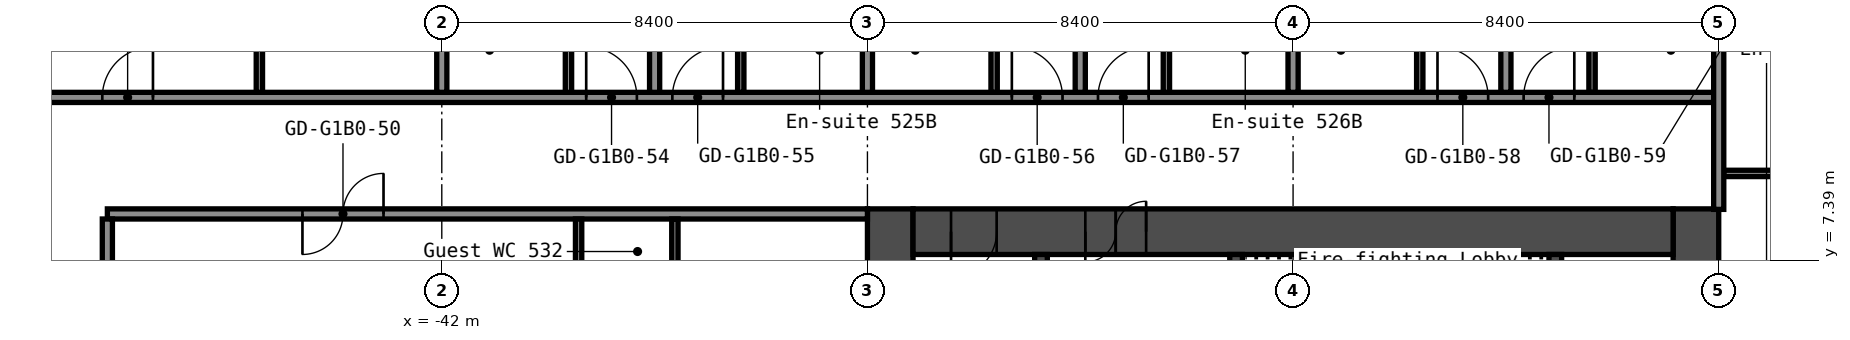
"""IFC4 building model, lengths in metres.
Left out: names, types, materials, properties, quantities, classifications, styles, units other than length and angle.
Written with IfcOpenShell. Run it as: python <this file> out.ifc"""

import sys

from ifc_helpers import new_model, si_unit, direction, frame, frame_2d, origin, place, context, subcontext, project, spatial, rectangle, extrude, element, fill, save


model = new_model("IFC4")
c1 = context("Model", 3, precision=1e-05, world=origin(), true_north=direction((0.0, 1.0)))
c2 = subcontext(c1, "Body", "Model", "MODEL_VIEW")
j1 = project(units=[si_unit("LENGTHUNIT", "METRE"), si_unit("PLANEANGLEUNIT", "RADIAN")], contexts=[c1])
p1 = place(None, origin())
s1 = spatial("IfcSite", under=j1, at=p1, CompositionType="ELEMENT")
p2 = place(p1, origin())
s2 = spatial("IfcBuilding", under=s1, at=p2, CompositionType="ELEMENT")
p3 = place(p2, frame((0.0, 0.0, 23.0)))
s3 = spatial("IfcBuildingStorey", under=s2, at=p3, CompositionType="ELEMENT", Elevation=23.0)
p4 = place(p3, frame((-17.25, -8.4, 0.0), z_axis=(0.0, 0.0, 1.0), x_axis=(0.0, 1.0, 0.0)))
e1 = element("IfcWall", 1, at=p4, inside=s3, PredefinedType="SHEAR", context=c2, shape_type="SweptSolid", body=[
    extrude(rectangle(XDim=16.8, YDim=0.9, at=frame_2d((8.4, 0.0))), origin(), (0.0, 0.0, 1.0), 2.8),
])
p5 = place(p4, frame((12.75, 0.0, 0.0)))
e2 = element("IfcOpeningElement", 2, at=p5, cuts=e1, PredefinedType="OPENING", context=c2, shape_type="SweptSolid", body=[
    extrude(rectangle(XDim=1.2, YDim=2.1, at=frame_2d((0.6, 1.05))), frame((0.0, 0.46, 0.0), z_axis=(0.0, -1.0, 0.0), x_axis=(1.0, 0.0, 0.0)), (0.0, 0.0, 1.0), 0.92),
])
p6 = place(p4, frame((2.85, 0.0, 0.0)))
e3 = element("IfcOpeningElement", 3, at=p6, cuts=e1, PredefinedType="OPENING", context=c2, shape_type="SweptSolid", body=[
    extrude(rectangle(XDim=1.2, YDim=2.1, at=frame_2d((0.6, 1.05))), frame((0.0, 0.46, 0.0), z_axis=(0.0, -1.0, 0.0), x_axis=(1.0, 0.0, 0.0)), (0.0, 0.0, 1.0), 0.92),
])
p7 = place(p3, frame((-33.15, -8.4, 0.0), z_axis=(0.0, 0.0, 1.0), x_axis=(0.0, 1.0, 0.0)))
e4 = element("IfcWall", 4, at=p7, inside=s3, PredefinedType="SHEAR", context=c2, shape_type="SweptSolid", body=[
    extrude(rectangle(XDim=16.8, YDim=0.9, at=frame_2d((8.4, 0.0))), origin(), (0.0, 0.0, 1.0), 2.8),
])
p8 = place(p3, frame((-32.7, 7.95, 0.0), z_axis=(0.0, 0.0, 1.0), x_axis=(1.0, 0.0, 0.0)))
e5 = element("IfcWall", 5, at=p8, inside=s3, PredefinedType="SHEAR", context=c2, shape_type="SweptSolid", body=[
    extrude(rectangle(XDim=15.0, YDim=0.9, at=frame_2d((7.5, 0.0))), origin(), (0.0, 0.0, 1.0), 2.8),
])
p9 = place(p8, frame((3.4, 0.0, 0.0)))
e6 = element("IfcOpeningElement", 6, at=p9, cuts=e5, PredefinedType="OPENING", context=c2, shape_type="SweptSolid", body=[
    extrude(rectangle(XDim=1.2, YDim=2.1, at=frame_2d((0.6, 1.05))), frame((0.0, 0.46, 0.0), z_axis=(0.0, -1.0, 0.0), x_axis=(1.0, 0.0, 0.0)), (0.0, 0.0, 1.0), 0.92),
])
p10 = place(p8, frame((0.75, 0.0, 0.0)))
e7 = element("IfcOpeningElement", 7, at=p10, cuts=e5, PredefinedType="OPENING", context=c2, shape_type="SweptSolid", body=[
    extrude(rectangle(XDim=0.9, YDim=2.1, at=frame_2d((0.45, 1.05))), frame((0.0, 0.46, 0.0), z_axis=(0.0, -1.0, 0.0), x_axis=(1.0, 0.0, 0.0)), (0.0, 0.0, 1.0), 0.92),
])
p11 = place(p3, frame((-20.025, 1.2, 0.0), z_axis=(0.0, 0.0, 1.0), x_axis=(0.0, 1.0, 0.0)))
e8 = element("IfcWall", 8, at=p11, inside=s3, PredefinedType="SHEAR", context=c2, shape_type="SweptSolid", body=[
    extrude(rectangle(XDim=6.3, YDim=0.25, at=frame_2d((3.15, 0.0))), origin(), (0.0, 0.0, 1.0), 2.8),
])
p12 = place(p3, frame((-26.325, 3.75, 0.0), z_axis=(0.0, 0.0, 1.0), x_axis=(0.0, 1.0, 0.0)))
e9 = element("IfcWall", 9, at=p12, inside=s3, PredefinedType="SHEAR", context=c2, shape_type="SweptSolid", body=[
    extrude(rectangle(XDim=3.75, YDim=0.25, at=frame_2d((1.875, 0.0))), origin(), (0.0, 0.0, 1.0), 2.8),
])
p13 = place(p12, frame((1.25, 0.0, 0.0)))
e10 = element("IfcOpeningElement", 10, at=p13, cuts=e9, PredefinedType="OPENING", context=c2, shape_type="SweptSolid", body=[
    extrude(rectangle(XDim=1.2, YDim=2.1, at=frame_2d((0.6, 1.05))), frame((0.0, 0.135, 0.0), z_axis=(0.0, -1.0, 0.0), x_axis=(1.0, 0.0, 0.0)), (0.0, 0.0, 1.0), 0.27),
])
p14 = place(p3, frame((-30.175, 1.45, 0.0), z_axis=(0.0, 0.0, 1.0), x_axis=(0.0, 1.0, 0.0)))
e11 = element("IfcWall", 11, at=p14, inside=s3, PredefinedType="SHEAR", context=c2, shape_type="SweptSolid", body=[
    extrude(rectangle(XDim=6.05, YDim=0.25, at=frame_2d((3.025, 0.0))), origin(), (0.0, 0.0, 1.0), 2.8),
])
p15 = place(p14, frame((2.625, 0.0, 0.0)))
e12 = element("IfcOpeningElement", 12, at=p15, cuts=e11, PredefinedType="OPENING", context=c2, shape_type="SweptSolid", body=[
    extrude(rectangle(XDim=1.1, YDim=2.1, at=frame_2d((0.55, 1.05))), frame((0.0, 0.135, 0.0), z_axis=(0.0, -1.0, 0.0), x_axis=(1.0, 0.0, 0.0)), (0.0, 0.0, 1.0), 0.27),
])
p16 = place(p3, frame((-48.6, 8.3, 0.0), z_axis=(0.0, 0.0, 1.0), x_axis=(1.0, 0.0, 0.0)))
e13 = element("IfcWall", 13, at=p16, inside=s3, PredefinedType="PARTITIONING", context=c2, shape_type="SweptSolid", body=[
    extrude(rectangle(XDim=15.0, YDim=0.2, at=frame_2d((7.5, 0.0))), origin(), (0.0, 0.0, 1.0), 2.8),
])
p17 = place(p16, frame((3.85, 0.0, 0.0)))
e14 = element("IfcOpeningElement", 14, at=p17, cuts=e13, PredefinedType="OPENING", context=c2, shape_type="SweptSolid", body=[
    extrude(rectangle(XDim=1.6, YDim=2.1, at=frame_2d((0.8, 1.05))), frame((0.0, 0.11, 0.0), z_axis=(0.0, -1.0, 0.0), x_axis=(1.0, 0.0, 0.0)), (0.0, 0.0, 1.0), 0.22),
])
p18 = place(p3, frame((-16.7, 9.1, 0.0), z_axis=(0.0, 0.0, 1.0), x_axis=(1.0, 0.0, 0.0)))
e15 = element("IfcWall", 15, at=p18, inside=s3, PredefinedType="PARTITIONING", context=c2, shape_type="SweptSolid", body=[
    extrude(rectangle(XDim=2.337, YDim=0.125, at=frame_2d((1.169, 0.0))), origin(), (0.0, 0.0, 1.0), 2.8),
])
p19 = place(p3, frame((-51.1, 10.6, 0.0), z_axis=(0.0, 0.0, 1.0), x_axis=(1.0, 0.0, 0.0)))
e16 = element("IfcWall", 16, at=p19, inside=s3, PredefinedType="PARTITIONING", context=c2, shape_type="SweptSolid", body=[
    extrude(rectangle(XDim=34.3, YDim=0.2, at=frame_2d((17.15, 0.0))), origin(), (0.0, 0.0, 1.0), 2.8),
])
p20 = place(p19, frame((2.4, 0.0, 0.0)))
e17 = element("IfcOpeningElement", 17, at=p20, cuts=e16, PredefinedType="OPENING", context=c2, shape_type="SweptSolid", body=[
    extrude(rectangle(XDim=1.0, YDim=2.1, at=frame_2d((0.5, 1.05))), frame((0.0, 0.11, 0.0), z_axis=(0.0, -1.0, 0.0), x_axis=(1.0, 0.0, 0.0)), (0.0, 0.0, 1.0), 0.22),
])
p21 = place(p19, frame((11.95, 0.0, 0.0)))
e18 = element("IfcOpeningElement", 18, at=p21, cuts=e16, PredefinedType="OPENING", context=c2, shape_type="SweptSolid", body=[
    extrude(rectangle(XDim=1.0, YDim=2.1, at=frame_2d((0.5, 1.05))), frame((0.0, 0.11, 0.0), z_axis=(0.0, -1.0, 0.0), x_axis=(1.0, 0.0, 0.0)), (0.0, 0.0, 1.0), 0.22),
])
p22 = place(p19, frame((13.65, 0.0, 0.0)))
e19 = element("IfcOpeningElement", 19, at=p22, cuts=e16, PredefinedType="OPENING", context=c2, shape_type="SweptSolid", body=[
    extrude(rectangle(XDim=1.0, YDim=2.1, at=frame_2d((0.5, 1.05))), frame((0.0, 0.11, 0.0), z_axis=(0.0, -1.0, 0.0), x_axis=(1.0, 0.0, 0.0)), (0.0, 0.0, 1.0), 0.22),
])
p23 = place(p19, frame((20.35, 0.0, 0.0)))
e20 = element("IfcOpeningElement", 20, at=p23, cuts=e16, PredefinedType="OPENING", context=c2, shape_type="SweptSolid", body=[
    extrude(rectangle(XDim=1.0, YDim=2.1, at=frame_2d((0.5, 1.05))), frame((0.0, 0.11, 0.0), z_axis=(0.0, -1.0, 0.0), x_axis=(1.0, 0.0, 0.0)), (0.0, 0.0, 1.0), 0.22),
])
p24 = place(p19, frame((22.05, 0.0, 0.0)))
e21 = element("IfcOpeningElement", 21, at=p24, cuts=e16, PredefinedType="OPENING", context=c2, shape_type="SweptSolid", body=[
    extrude(rectangle(XDim=1.0, YDim=2.1, at=frame_2d((0.5, 1.05))), frame((0.0, 0.11, 0.0), z_axis=(0.0, -1.0, 0.0), x_axis=(1.0, 0.0, 0.0)), (0.0, 0.0, 1.0), 0.22),
])
p25 = place(p19, frame((28.75, 0.0, 0.0)))
e22 = element("IfcOpeningElement", 22, at=p25, cuts=e16, PredefinedType="OPENING", context=c2, shape_type="SweptSolid", body=[
    extrude(rectangle(XDim=1.0, YDim=2.1, at=frame_2d((0.5, 1.05))), frame((0.0, 0.11, 0.0), z_axis=(0.0, -1.0, 0.0), x_axis=(1.0, 0.0, 0.0)), (0.0, 0.0, 1.0), 0.22),
])
p26 = place(p19, frame((30.45, 0.0, 0.0)))
e23 = element("IfcOpeningElement", 23, at=p26, cuts=e16, PredefinedType="OPENING", context=c2, shape_type="SweptSolid", body=[
    extrude(rectangle(XDim=1.0, YDim=2.1, at=frame_2d((0.5, 1.05))), frame((0.0, 0.11, 0.0), z_axis=(0.0, -1.0, 0.0), x_axis=(1.0, 0.0, 0.0)), (0.0, 0.0, 1.0), 0.22),
])
p27 = place(p3, frame((-48.6, -8.2, 0.0), z_axis=(0.0, 0.0, 1.0), x_axis=(0.0, 1.0, 0.0)))
e24 = element("IfcWall", 24, at=p27, inside=s3, PredefinedType="PARTITIONING", context=c2, shape_type="SweptSolid", body=[
    extrude(rectangle(XDim=16.4, YDim=0.2, at=frame_2d((8.2, 0.0))), origin(), (0.0, 0.0, 1.0), 2.8),
])
p28 = place(p3, frame((-45.6, 10.7, 0.0), z_axis=(0.0, 0.0, 1.0), x_axis=(0.0, 1.0, 0.0)))
e25 = element("IfcWall", 25, at=p28, inside=s3, PredefinedType="PARTITIONING", context=c2, shape_type="SweptSolid", body=[
    extrude(rectangle(XDim=3.3, YDim=0.125, at=frame_2d((1.65, 0.0))), origin(), (0.0, 0.0, 1.0), 2.8),
])
p29 = place(p28, frame((1.1, 0.0, 0.0)))
e26 = element("IfcOpeningElement", 26, at=p29, cuts=e25, PredefinedType="OPENING", context=c2, shape_type="SweptSolid", body=[
    extrude(rectangle(XDim=1.0, YDim=2.1, at=frame_2d((0.5, 1.05))), frame((0.0, 0.073, 0.0), z_axis=(0.0, -1.0, 0.0), x_axis=(1.0, 0.0, 0.0)), (0.0, 0.0, 1.0), 0.145),
])
p30 = place(p3, frame((-42.0, 10.7, 0.0), z_axis=(0.0, 0.0, 1.0), x_axis=(0.0, 1.0, 0.0)))
e27 = element("IfcWall", 27, at=p30, inside=s3, PredefinedType="PARTITIONING", context=c2, shape_type="SweptSolid", body=[
    extrude(rectangle(XDim=9.6, YDim=0.2, at=frame_2d((4.8, 0.0))), origin(), (0.0, 0.0, 1.0), 2.8),
])
p31 = place(p3, frame((-39.5, 10.7, 0.0), z_axis=(0.0, 0.0, 1.0), x_axis=(0.0, 1.0, 0.0)))
e28 = element("IfcWall", 28, at=p31, inside=s3, PredefinedType="PARTITIONING", context=c2, shape_type="SweptSolid", body=[
    extrude(rectangle(XDim=2.9, YDim=0.125, at=frame_2d((1.45, 0.0))), origin(), (0.0, 0.0, 1.0), 2.8),
])
p32 = place(p31, frame((1.5, 0.0, 0.0)))
e29 = element("IfcOpeningElement", 29, at=p32, cuts=e28, PredefinedType="OPENING", context=c2, shape_type="SweptSolid", body=[
    extrude(rectangle(XDim=0.8, YDim=2.1, at=frame_2d((0.4, 1.05))), frame((0.0, 0.073, 0.0), z_axis=(0.0, -1.0, 0.0), x_axis=(1.0, 0.0, 0.0)), (0.0, 0.0, 1.0), 0.145),
])
p33 = place(p3, frame((-39.3, 5.9, 0.0), z_axis=(0.0, 0.0, 1.0), x_axis=(0.0, 1.0, 0.0)))
e30 = element("IfcWall", 30, at=p33, inside=s3, PredefinedType="PARTITIONING", context=c2, shape_type="SweptSolid", body=[
    extrude(rectangle(XDim=2.3, YDim=0.125, at=frame_2d((1.15, 0.0))), origin(), (0.0, 0.0, 1.0), 2.8),
])
p34 = place(p3, frame((-37.8, 10.7, 0.0), z_axis=(0.0, 0.0, 1.0), x_axis=(0.0, 1.0, 0.0)))
e31 = element("IfcWall", 31, at=p34, inside=s3, PredefinedType="PARTITIONING", context=c2, shape_type="SweptSolid", body=[
    extrude(rectangle(XDim=9.6, YDim=0.2, at=frame_2d((4.8, 0.0))), origin(), (0.0, 0.0, 1.0), 2.8),
])
p35 = place(p3, frame((-37.4, 4.9, 0.0), z_axis=(0.0, 0.0, 1.0), x_axis=(0.0, 1.0, 0.0)))
e32 = element("IfcWall", 32, at=p35, inside=s3, PredefinedType="PARTITIONING", context=c2, shape_type="SweptSolid", body=[
    extrude(rectangle(XDim=3.3, YDim=0.125, at=frame_2d((1.65, 0.0))), origin(), (0.0, 0.0, 1.0), 2.8),
])
p36 = place(p3, frame((-36.1, 10.7, 0.0), z_axis=(0.0, 0.0, 1.0), x_axis=(0.0, 1.0, 0.0)))
e33 = element("IfcWall", 33, at=p36, inside=s3, PredefinedType="PARTITIONING", context=c2, shape_type="SweptSolid", body=[
    extrude(rectangle(XDim=2.9, YDim=0.125, at=frame_2d((1.45, 0.0))), origin(), (0.0, 0.0, 1.0), 2.8),
])
p37 = place(p36, frame((1.5, 0.0, 0.0)))
e34 = element("IfcOpeningElement", 34, at=p37, cuts=e33, PredefinedType="OPENING", context=c2, shape_type="SweptSolid", body=[
    extrude(rectangle(XDim=0.8, YDim=2.1, at=frame_2d((0.4, 1.05))), frame((0.0, 0.073, 0.0), z_axis=(0.0, -1.0, 0.0), x_axis=(1.0, 0.0, 0.0)), (0.0, 0.0, 1.0), 0.145),
])
p38 = place(p3, frame((-33.6, 10.7, 0.0), z_axis=(0.0, 0.0, 1.0), x_axis=(0.0, 1.0, 0.0)))
e35 = element("IfcWall", 35, at=p38, inside=s3, PredefinedType="PARTITIONING", context=c2, shape_type="SweptSolid", body=[
    extrude(rectangle(XDim=9.6, YDim=0.2, at=frame_2d((4.8, 0.0))), origin(), (0.0, 0.0, 1.0), 2.8),
])
p39 = place(p3, frame((-31.1, 10.7, 0.0), z_axis=(0.0, 0.0, 1.0), x_axis=(0.0, 1.0, 0.0)))
e36 = element("IfcWall", 36, at=p39, inside=s3, PredefinedType="PARTITIONING", context=c2, shape_type="SweptSolid", body=[
    extrude(rectangle(XDim=2.9, YDim=0.125, at=frame_2d((1.45, 0.0))), origin(), (0.0, 0.0, 1.0), 2.8),
])
p40 = place(p39, frame((1.5, 0.0, 0.0)))
e37 = element("IfcOpeningElement", 37, at=p40, cuts=e36, PredefinedType="OPENING", context=c2, shape_type="SweptSolid", body=[
    extrude(rectangle(XDim=0.8, YDim=2.1, at=frame_2d((0.4, 1.05))), frame((0.0, 0.073, 0.0), z_axis=(0.0, -1.0, 0.0), x_axis=(1.0, 0.0, 0.0)), (0.0, 0.0, 1.0), 0.145),
])
p41 = place(p3, frame((-29.4, 10.7, 0.0), z_axis=(0.0, 0.0, 1.0), x_axis=(0.0, 1.0, 0.0)))
e38 = element("IfcWall", 38, at=p41, inside=s3, PredefinedType="PARTITIONING", context=c2, shape_type="SweptSolid", body=[
    extrude(rectangle(XDim=9.6, YDim=0.2, at=frame_2d((4.8, 0.0))), origin(), (0.0, 0.0, 1.0), 2.8),
])
p42 = place(p3, frame((-27.7, 10.7, 0.0), z_axis=(0.0, 0.0, 1.0), x_axis=(0.0, 1.0, 0.0)))
e39 = element("IfcWall", 39, at=p42, inside=s3, PredefinedType="PARTITIONING", context=c2, shape_type="SweptSolid", body=[
    extrude(rectangle(XDim=2.9, YDim=0.125, at=frame_2d((1.45, 0.0))), origin(), (0.0, 0.0, 1.0), 2.8),
])
p43 = place(p42, frame((1.5, 0.0, 0.0)))
e40 = element("IfcOpeningElement", 40, at=p43, cuts=e39, PredefinedType="OPENING", context=c2, shape_type="SweptSolid", body=[
    extrude(rectangle(XDim=0.8, YDim=2.1, at=frame_2d((0.4, 1.05))), frame((0.0, 0.073, 0.0), z_axis=(0.0, -1.0, 0.0), x_axis=(1.0, 0.0, 0.0)), (0.0, 0.0, 1.0), 0.145),
])
p44 = place(p3, frame((-25.2, 10.7, 0.0), z_axis=(0.0, 0.0, 1.0), x_axis=(0.0, 1.0, 0.0)))
e41 = element("IfcWall", 41, at=p44, inside=s3, PredefinedType="PARTITIONING", context=c2, shape_type="SweptSolid", body=[
    extrude(rectangle(XDim=9.6, YDim=0.2, at=frame_2d((4.8, 0.0))), origin(), (0.0, 0.0, 1.0), 2.8),
])
p45 = place(p3, frame((-22.7, 10.7, 0.0), z_axis=(0.0, 0.0, 1.0), x_axis=(0.0, 1.0, 0.0)))
e42 = element("IfcWall", 42, at=p45, inside=s3, PredefinedType="PARTITIONING", context=c2, shape_type="SweptSolid", body=[
    extrude(rectangle(XDim=2.9, YDim=0.125, at=frame_2d((1.45, 0.0))), origin(), (0.0, 0.0, 1.0), 2.8),
])
p46 = place(p45, frame((1.5, 0.0, 0.0)))
e43 = element("IfcOpeningElement", 43, at=p46, cuts=e42, PredefinedType="OPENING", context=c2, shape_type="SweptSolid", body=[
    extrude(rectangle(XDim=0.8, YDim=2.1, at=frame_2d((0.4, 1.05))), frame((0.0, 0.073, 0.0), z_axis=(0.0, -1.0, 0.0), x_axis=(1.0, 0.0, 0.0)), (0.0, 0.0, 1.0), 0.145),
])
p47 = place(p3, frame((-21.0, 10.7, 0.0), z_axis=(0.0, 0.0, 1.0), x_axis=(0.0, 1.0, 0.0)))
e44 = element("IfcWall", 44, at=p47, inside=s3, PredefinedType="PARTITIONING", context=c2, shape_type="SweptSolid", body=[
    extrude(rectangle(XDim=9.6, YDim=0.2, at=frame_2d((4.8, 0.0))), origin(), (0.0, 0.0, 1.0), 2.8),
])
p48 = place(p3, frame((-19.3, 10.7, 0.0), z_axis=(0.0, 0.0, 1.0), x_axis=(0.0, 1.0, 0.0)))
e45 = element("IfcWall", 45, at=p48, inside=s3, PredefinedType="PARTITIONING", context=c2, shape_type="SweptSolid", body=[
    extrude(rectangle(XDim=2.9, YDim=0.125, at=frame_2d((1.45, 0.0))), origin(), (0.0, 0.0, 1.0), 2.8),
])
p49 = place(p48, frame((1.5, 0.0, 0.0)))
e46 = element("IfcOpeningElement", 46, at=p49, cuts=e45, PredefinedType="OPENING", context=c2, shape_type="SweptSolid", body=[
    extrude(rectangle(XDim=0.8, YDim=2.1, at=frame_2d((0.4, 1.05))), frame((0.0, 0.073, 0.0), z_axis=(0.0, -1.0, 0.0), x_axis=(1.0, 0.0, 0.0)), (0.0, 0.0, 1.0), 0.145),
])
p50 = place(p3, frame((-16.8, 8.39, 0.0), z_axis=(0.0, 0.0, 1.0), x_axis=(0.0, 1.0, 0.0)))
e47 = element("IfcWall", 47, at=p50, inside=s3, PredefinedType="PARTITIONING", context=c2, shape_type="SweptSolid", body=[
    extrude(rectangle(XDim=11.91, YDim=0.2, at=frame_2d((5.955, 0.0))), origin(), (0.0, 0.0, 1.0), 2.8),
])
p51 = place(p9, origin())
e48 = element("IfcDoor", 48, at=p51, inside=s3, OperationType="DOUBLE_DOOR_SINGLE_SWING", PredefinedType="DOOR", context=c2, shape_type="SweptSolid", body=[
    extrude(rectangle(XDim=1.2, YDim=2.1, at=frame_2d((0.6, 1.05))), frame((0.0, 0.025, 0.0), z_axis=(0.0, -1.0, 0.0), x_axis=(1.0, 0.0, 0.0)), (0.0, 0.0, 1.0), 0.05),
])
fill(e6, e48)
p52 = place(p10, origin())
e49 = element("IfcDoor", 49, at=p52, inside=s3, OperationType="SINGLE_SWING_LEFT", PredefinedType="DOOR", context=c2, shape_type="SweptSolid", body=[
    extrude(rectangle(XDim=0.9, YDim=2.1, at=frame_2d((0.45, 1.05))), frame((0.0, 0.025, 0.0), z_axis=(0.0, -1.0, 0.0), x_axis=(1.0, 0.0, 0.0)), (0.0, 0.0, 1.0), 0.05),
])
fill(e7, e49)
p53 = place(p17, origin())
e50 = element("IfcDoor", 50, at=p53, inside=s3, OperationType="DOUBLE_DOOR_SINGLE_SWING", PredefinedType="DOOR", context=c2, shape_type="SweptSolid", body=[
    extrude(rectangle(XDim=1.6, YDim=2.1, at=frame_2d((0.8, 1.05))), frame((0.0, 0.025, 0.0), z_axis=(0.0, -1.0, 0.0), x_axis=(1.0, 0.0, 0.0)), (0.0, 0.0, 1.0), 0.05),
])
fill(e14, e50)
p54 = place(p20, origin())
e51 = element("IfcDoor", 51, at=p54, inside=s3, OperationType="SINGLE_SWING_LEFT", PredefinedType="DOOR", context=c2, shape_type="SweptSolid", body=[
    extrude(rectangle(XDim=1.0, YDim=2.1, at=frame_2d((0.5, 1.05))), frame((0.0, 0.025, 0.0), z_axis=(0.0, -1.0, 0.0), x_axis=(1.0, 0.0, 0.0)), (0.0, 0.0, 1.0), 0.05),
])
fill(e17, e51)
p55 = place(p21, origin())
e52 = element("IfcDoor", 52, at=p55, inside=s3, OperationType="SINGLE_SWING_RIGHT", PredefinedType="DOOR", context=c2, shape_type="SweptSolid", body=[
    extrude(rectangle(XDim=1.0, YDim=2.1, at=frame_2d((0.5, 1.05))), frame((0.0, 0.025, 0.0), z_axis=(0.0, -1.0, 0.0), x_axis=(1.0, 0.0, 0.0)), (0.0, 0.0, 1.0), 0.05),
])
fill(e18, e52)
p56 = place(p22, origin())
e53 = element("IfcDoor", 53, at=p56, inside=s3, OperationType="SINGLE_SWING_LEFT", PredefinedType="DOOR", context=c2, shape_type="SweptSolid", body=[
    extrude(rectangle(XDim=1.0, YDim=2.1, at=frame_2d((0.5, 1.05))), frame((0.0, 0.025, 0.0), z_axis=(0.0, -1.0, 0.0), x_axis=(1.0, 0.0, 0.0)), (0.0, 0.0, 1.0), 0.05),
])
fill(e19, e53)
p57 = place(p23, origin())
e54 = element("IfcDoor", 54, at=p57, inside=s3, OperationType="SINGLE_SWING_RIGHT", PredefinedType="DOOR", context=c2, shape_type="SweptSolid", body=[
    extrude(rectangle(XDim=1.0, YDim=2.1, at=frame_2d((0.5, 1.05))), frame((0.0, 0.025, 0.0), z_axis=(0.0, -1.0, 0.0), x_axis=(1.0, 0.0, 0.0)), (0.0, 0.0, 1.0), 0.05),
])
fill(e20, e54)
p58 = place(p24, origin())
e55 = element("IfcDoor", 55, at=p58, inside=s3, OperationType="SINGLE_SWING_LEFT", PredefinedType="DOOR", context=c2, shape_type="SweptSolid", body=[
    extrude(rectangle(XDim=1.0, YDim=2.1, at=frame_2d((0.5, 1.05))), frame((0.0, 0.025, 0.0), z_axis=(0.0, -1.0, 0.0), x_axis=(1.0, 0.0, 0.0)), (0.0, 0.0, 1.0), 0.05),
])
fill(e21, e55)
p59 = place(p25, origin())
e56 = element("IfcDoor", 56, at=p59, inside=s3, OperationType="SINGLE_SWING_RIGHT", PredefinedType="DOOR", context=c2, shape_type="SweptSolid", body=[
    extrude(rectangle(XDim=1.0, YDim=2.1, at=frame_2d((0.5, 1.05))), frame((0.0, 0.025, 0.0), z_axis=(0.0, -1.0, 0.0), x_axis=(1.0, 0.0, 0.0)), (0.0, 0.0, 1.0), 0.05),
])
fill(e22, e56)
p60 = place(p26, origin())
e57 = element("IfcDoor", 57, at=p60, inside=s3, OperationType="SINGLE_SWING_LEFT", PredefinedType="DOOR", context=c2, shape_type="SweptSolid", body=[
    extrude(rectangle(XDim=1.0, YDim=2.1, at=frame_2d((0.5, 1.05))), frame((0.0, 0.025, 0.0), z_axis=(0.0, -1.0, 0.0), x_axis=(1.0, 0.0, 0.0)), (0.0, 0.0, 1.0), 0.05),
])
fill(e23, e57)
save(model, sys.argv[1])
